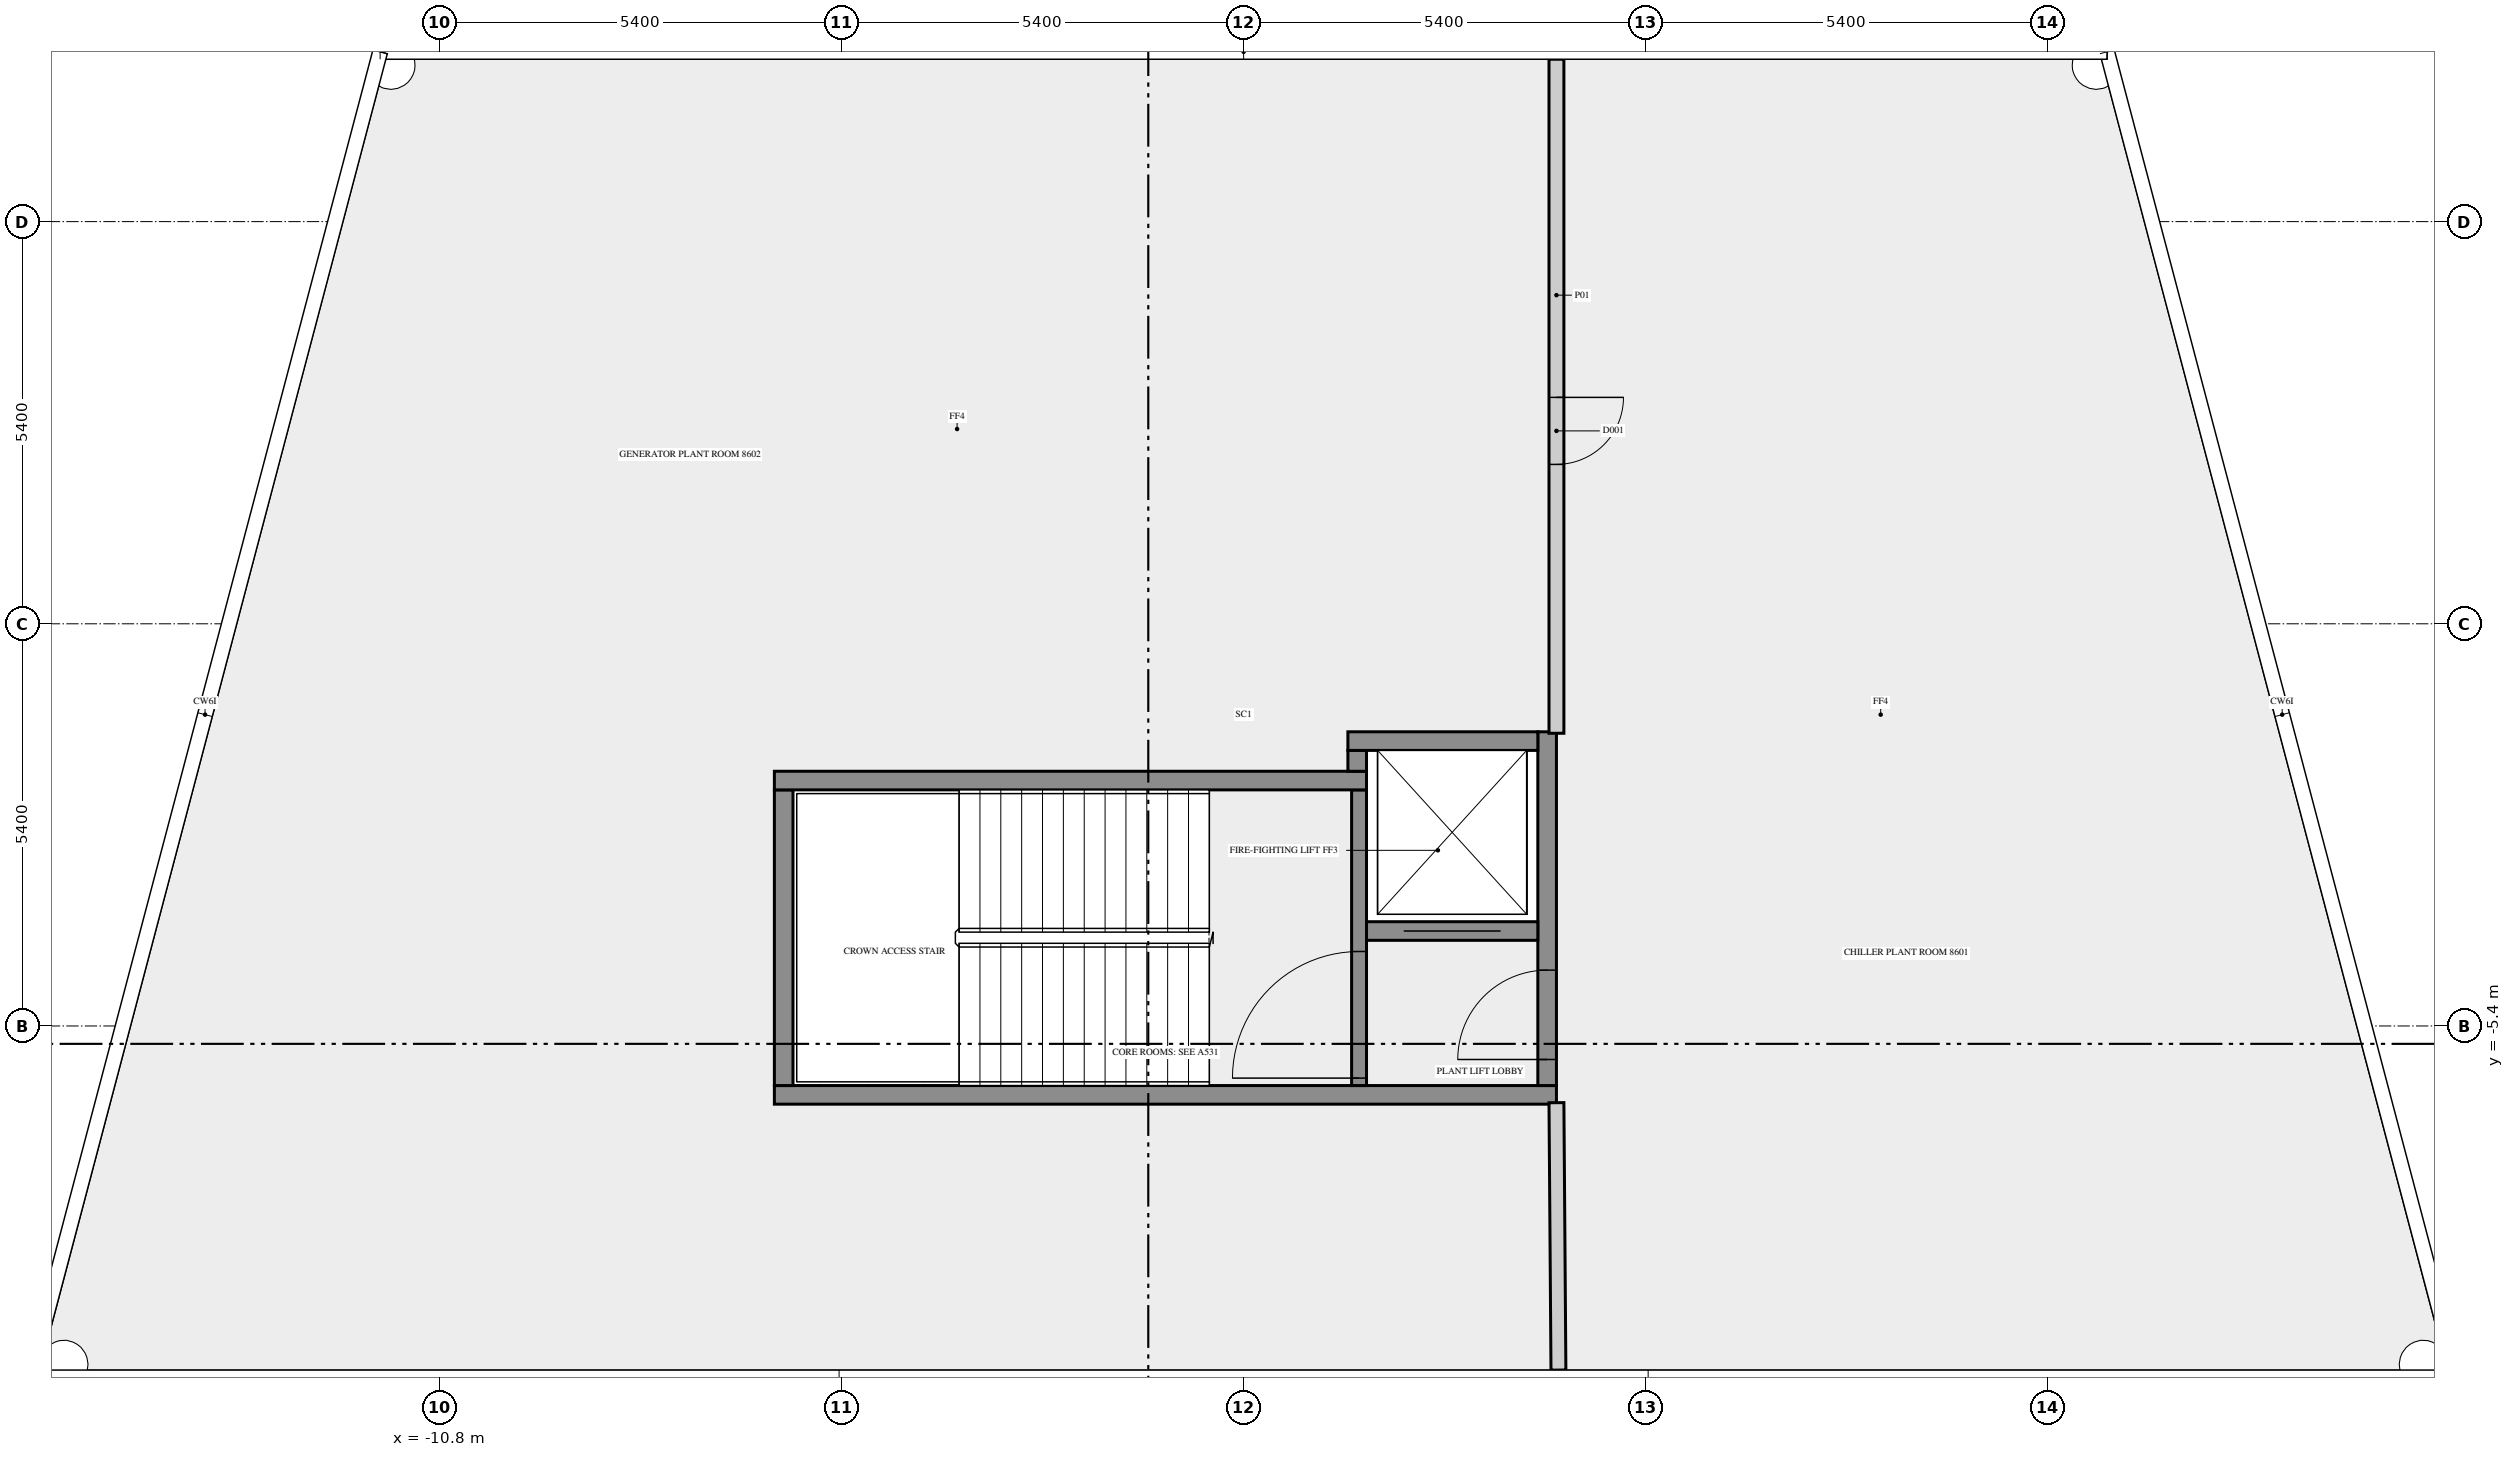
"""IFC4 building model, lengths in metres.
Left out: names, types, materials, properties, quantities, classifications, styles, units other than length and angle.
Written with IfcOpenShell. Run it as: python <this file> out.ifc"""

import sys

from ifc_helpers import new_model, si_unit, direction, frame, frame_2d, origin, place, context, subcontext, project, spatial, rectangle, extrude, element, fill, save


model = new_model("IFC4")
c1 = context("Model", 3, precision=1e-05, world=origin(), true_north=direction((0.0, 1.0)))
c2 = subcontext(c1, "Body", "Model", "MODEL_VIEW")
j1 = project(units=[si_unit("LENGTHUNIT", "METRE"), si_unit("PLANEANGLEUNIT", "RADIAN")], contexts=[c1])
p1 = place(None, origin())
s1 = spatial("IfcSite", under=j1, at=p1, CompositionType="ELEMENT")
p2 = place(p1, origin())
s2 = spatial("IfcBuilding", under=s1, at=p2, CompositionType="ELEMENT")
p3 = place(p2, frame((0.0, 0.0, 372.0)))
s3 = spatial("IfcBuildingStorey", under=s2, at=p3, CompositionType="ELEMENT", Elevation=372.0)
p4 = place(p3, frame((-6.3, -6.325, 0.0), z_axis=(0.0, 0.0, 1.0), x_axis=(1.0, 0.0, 0.0)))
e1 = element("IfcWall", 1, at=p4, inside=s3, PredefinedType="SHEAR", context=c2, shape_type="SweptSolid", body=[
    extrude(rectangle(XDim=10.5, YDim=0.25, at=frame_2d((5.25, 0.0))), origin(), (0.0, 0.0, 1.0), 3.75),
])
p5 = place(p3, frame((-6.175, -6.2, 0.0), z_axis=(0.0, 0.0, 1.0), x_axis=(0.0, 1.0, 0.0)))
e2 = element("IfcWall", 2, at=p5, inside=s3, PredefinedType="SHEAR", context=c2, shape_type="SweptSolid", body=[
    extrude(rectangle(XDim=3.97, YDim=0.25, at=frame_2d((1.985, 0.0))), origin(), (0.0, 0.0, 1.0), 3.75),
])
p6 = place(p3, frame((1.55, -6.2, 0.0), z_axis=(0.0, 0.0, 1.0), x_axis=(0.0, 1.0, 0.0)))
e3 = element("IfcWall", 3, at=p6, inside=s3, PredefinedType="SHEAR", context=c2, shape_type="SweptSolid", body=[
    extrude(rectangle(XDim=3.97, YDim=0.2, at=frame_2d((1.985, 0.0))), origin(), (0.0, 0.0, 1.0), 3.75),
])
p7 = place(p6, frame((0.1, 0.0, 0.0)))
e4 = element("IfcOpeningElement", 4, at=p7, cuts=e3, PredefinedType="OPENING", context=c2, shape_type="SweptSolid", body=[
    extrude(rectangle(XDim=1.7, YDim=2.1, at=frame_2d((0.85, 1.05))), frame((0.0, 0.11, 0.0), z_axis=(0.0, -1.0, 0.0), x_axis=(1.0, 0.0, 0.0)), (0.0, 0.0, 1.0), 0.22),
])
p8 = place(p3, frame((4.075, -6.2, 0.0), z_axis=(0.0, 0.0, 1.0), x_axis=(0.0, 1.0, 0.0)))
e5 = element("IfcWall", 5, at=p8, inside=s3, PredefinedType="SHEAR", context=c2, shape_type="SweptSolid", body=[
    extrude(rectangle(XDim=4.75, YDim=0.25, at=frame_2d((2.375, 0.0))), origin(), (0.0, 0.0, 1.0), 3.75),
])
p9 = place(p8, frame((0.35, 0.0, 0.0)))
e6 = element("IfcOpeningElement", 6, at=p9, cuts=e5, PredefinedType="OPENING", context=c2, shape_type="SweptSolid", body=[
    extrude(rectangle(XDim=1.2, YDim=2.1, at=frame_2d((0.6, 1.05))), frame((0.0, 0.135, 0.0), z_axis=(0.0, -1.0, 0.0), x_axis=(1.0, 0.0, 0.0)), (0.0, 0.0, 1.0), 0.27),
])
p10 = place(p3, frame((1.65, -4.125, 0.0), z_axis=(0.0, 0.0, 1.0), x_axis=(1.0, 0.0, 0.0)))
e7 = element("IfcWall", 7, at=p10, inside=s3, PredefinedType="SHEAR", context=c2, shape_type="SweptSolid", body=[
    extrude(rectangle(XDim=2.3, YDim=0.25, at=frame_2d((1.15, 0.0))), origin(), (0.0, 0.0, 1.0), 3.75),
])
p11 = place(p10, frame((0.5, 0.0, 0.0)))
e8 = element("IfcOpeningElement", 8, at=p11, cuts=e7, PredefinedType="OPENING", context=c2, shape_type="SweptSolid", body=[
    extrude(rectangle(XDim=1.3, YDim=2.1, at=frame_2d((0.65, 1.05))), frame((0.0, 0.135, 0.0), z_axis=(0.0, -1.0, 0.0), x_axis=(1.0, 0.0, 0.0)), (0.0, 0.0, 1.0), 0.27),
])
p12 = place(p3, frame((-6.3, -2.105, 0.0), z_axis=(0.0, 0.0, 1.0), x_axis=(1.0, 0.0, 0.0)))
e9 = element("IfcWall", 9, at=p12, inside=s3, PredefinedType="SHEAR", context=c2, shape_type="SweptSolid", body=[
    extrude(rectangle(XDim=7.95, YDim=0.25, at=frame_2d((3.975, 0.0))), origin(), (0.0, 0.0, 1.0), 3.75),
])
p13 = place(p3, frame((1.525, -1.98, 0.0), z_axis=(0.0, 0.0, 1.0), x_axis=(0.0, 1.0, 0.0)))
e10 = element("IfcWall", 10, at=p13, inside=s3, PredefinedType="SHEAR", context=c2, shape_type="SweptSolid", body=[
    extrude(rectangle(XDim=0.28, YDim=0.25, at=frame_2d((0.14, 0.0))), origin(), (0.0, 0.0, 1.0), 3.75),
])
p14 = place(p3, frame((1.4, -1.575, 0.0), z_axis=(0.0, 0.0, 1.0), x_axis=(1.0, 0.0, 0.0)))
e11 = element("IfcWall", 11, at=p14, inside=s3, PredefinedType="SHEAR", context=c2, shape_type="SweptSolid", body=[
    extrude(rectangle(XDim=2.55, YDim=0.25, at=frame_2d((1.275, 0.0))), origin(), (0.0, 0.0, 1.0), 3.75),
])
p15 = place(p3, frame((4.2, 7.58, 0.0), z_axis=(0.0, 0.0, 1.0), x_axis=(0.0, -1.0, 0.0)))
e12 = element("IfcWall", 12, at=p15, inside=s3, PredefinedType="SOLIDWALL", context=c2, shape_type="SweptSolid", body=[
    extrude(rectangle(XDim=9.05, YDim=0.2, at=frame_2d((4.525, 0.0))), origin(), (0.0, 0.0, 1.0), 2.838),
])
p16 = place(p15, frame((4.54, 0.0, 0.0)))
e13 = element("IfcOpeningElement", 13, at=p16, cuts=e12, PredefinedType="OPENING", context=c2, shape_type="SweptSolid", body=[
    extrude(rectangle(XDim=0.9, YDim=2.1, at=frame_2d((0.45, 1.05))), frame((0.0, 0.11, 0.0), z_axis=(0.0, -1.0, 0.0), x_axis=(1.0, 0.0, 0.0)), (0.0, 0.0, 1.0), 0.22),
])
p17 = place(p3, frame((4.2, -6.43, 0.0), z_axis=(0.0, 0.0, 1.0), x_axis=(0.007480239544, -0.999972022617, 0.0)))
e14 = element("IfcWall", 14, at=p17, inside=s3, PredefinedType="SOLIDWALL", context=c2, shape_type="SweptSolid", body=[
    extrude(rectangle(XDim=3.59, YDim=0.2, at=frame_2d((1.795, 0.0))), origin(), (0.0, 0.0, 1.0), 2.25),
])
p18 = place(p7, origin())
e15 = element("IfcDoor", 15, at=p18, inside=s3, OperationType="DOUBLE_DOOR_SINGLE_SWING", PredefinedType="DOOR", context=c2, shape_type="SweptSolid", body=[
    extrude(rectangle(XDim=1.7, YDim=2.1, at=frame_2d((0.85, 1.05))), frame((0.0, 0.025, 0.0), z_axis=(0.0, -1.0, 0.0), x_axis=(1.0, 0.0, 0.0)), (0.0, 0.0, 1.0), 0.05),
])
fill(e4, e15)
p19 = place(p9, origin())
e16 = element("IfcDoor", 16, at=p19, inside=s3, OperationType="SINGLE_SWING_LEFT", PredefinedType="DOOR", context=c2, shape_type="SweptSolid", body=[
    extrude(rectangle(XDim=1.2, YDim=2.1, at=frame_2d((0.6, 1.05))), frame((0.0, 0.025, 0.0), z_axis=(0.0, -1.0, 0.0), x_axis=(1.0, 0.0, 0.0)), (0.0, 0.0, 1.0), 0.05),
])
fill(e6, e16)
p20 = place(p11, origin())
e17 = element("IfcDoor", 17, at=p20, inside=s3, OperationType="DOUBLE_DOOR_SLIDING", PredefinedType="DOOR", context=c2, shape_type="SweptSolid", body=[
    extrude(rectangle(XDim=1.3, YDim=2.1, at=frame_2d((0.65, 1.05))), frame((0.0, 0.025, 0.0), z_axis=(0.0, -1.0, 0.0), x_axis=(1.0, 0.0, 0.0)), (0.0, 0.0, 1.0), 0.05),
])
fill(e8, e17)
p21 = place(p16, origin())
e18 = element("IfcDoor", 18, at=p21, inside=s3, OperationType="SINGLE_SWING_LEFT", PredefinedType="DOOR", context=c2, shape_type="SweptSolid", body=[
    extrude(rectangle(XDim=0.9, YDim=2.1, at=frame_2d((0.45, 1.05))), frame((0.0, 0.025, 0.0), z_axis=(0.0, -1.0, 0.0), x_axis=(1.0, 0.0, 0.0)), (0.0, 0.0, 1.0), 0.05),
])
fill(e13, e18)
save(model, sys.argv[1])
